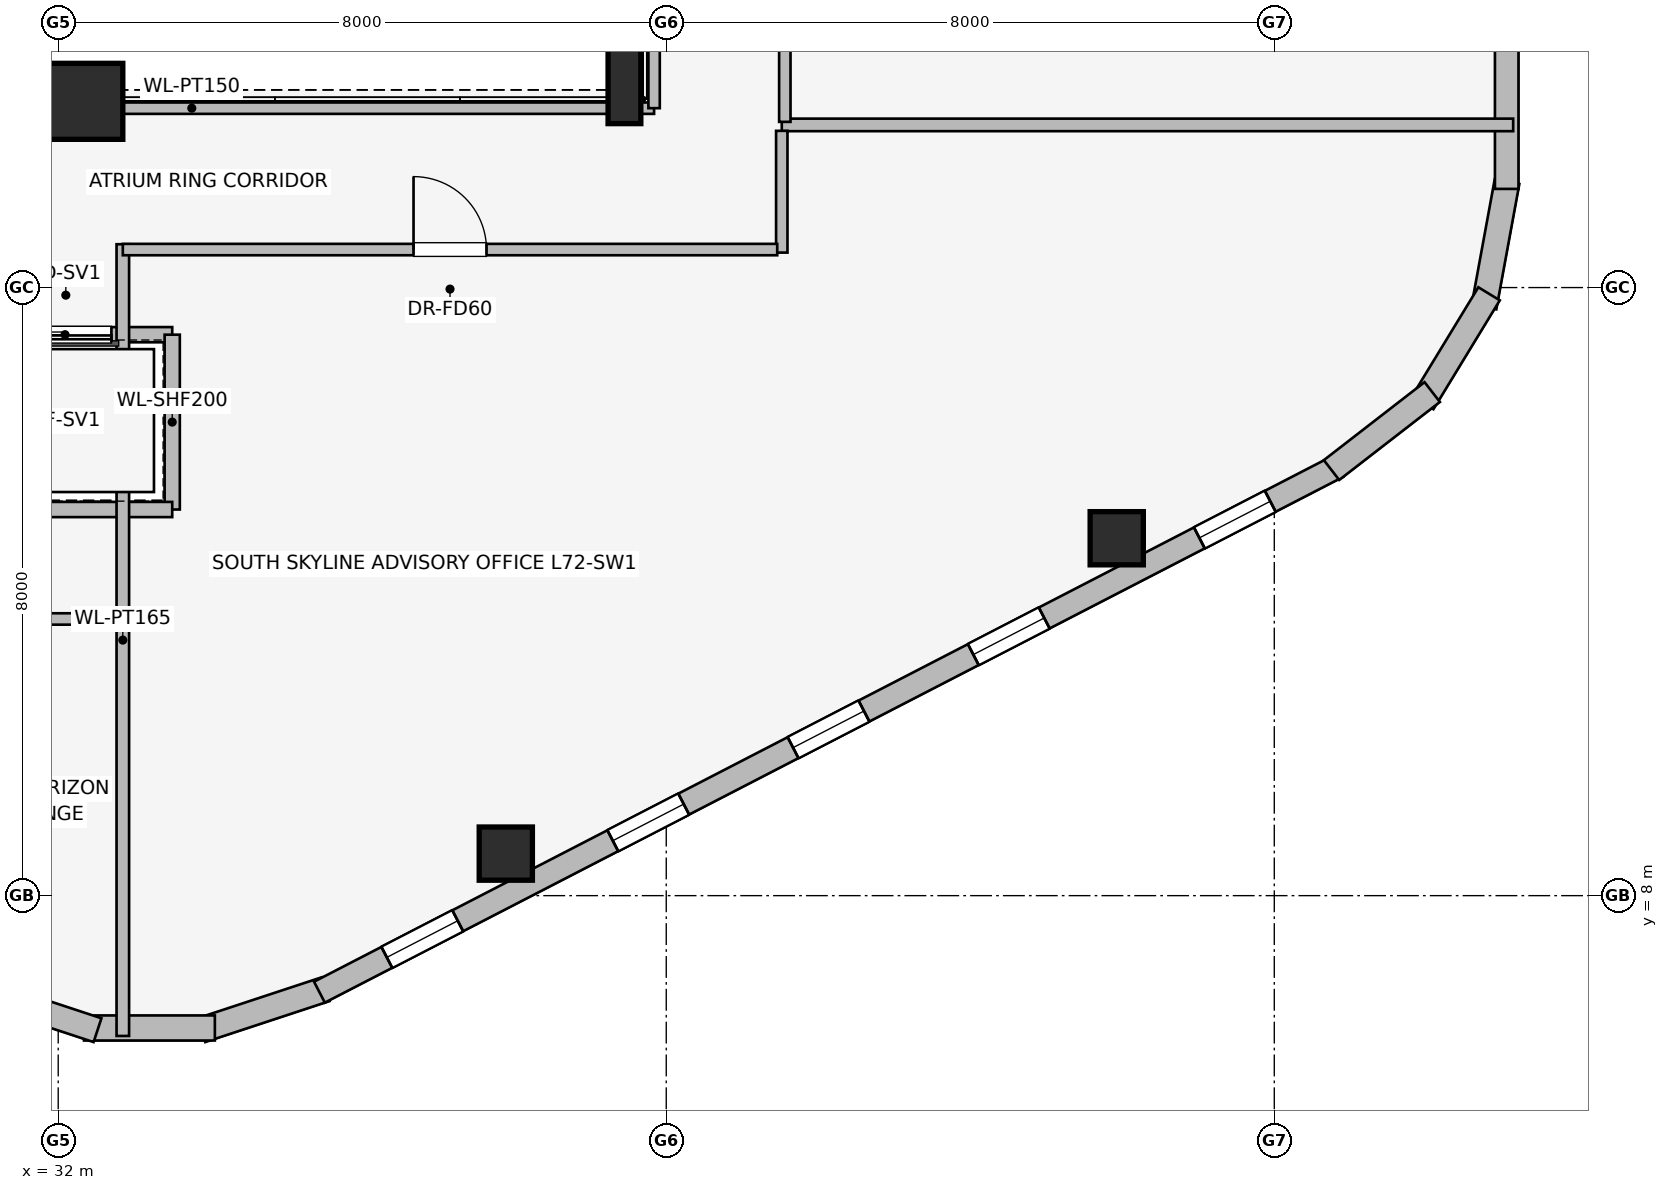
"""IFC4 building model, lengths in metres.
Left out: names, types, materials, properties, quantities, classifications, styles, units other than length and angle.
Written with IfcOpenShell. Run it as: python <this file> out.ifc"""

import sys

from ifc_helpers import new_model, si_unit, direction, frame, frame_2d, origin, origin_2d, place, context, subcontext, project, spatial, rectangle, i_section, extrude, element, fill, save


model = new_model("IFC4")
c1 = context("Model", 3, precision=1e-05, world=origin(), true_north=direction((0.0, 1.0)))
c2 = subcontext(c1, "Body", "Model", "MODEL_VIEW")
j1 = project(units=[si_unit("LENGTHUNIT", "METRE"), si_unit("PLANEANGLEUNIT", "RADIAN")], contexts=[c1])
p1 = place(None, origin())
s1 = spatial("IfcSite", under=j1, at=p1, CompositionType="ELEMENT")
p2 = place(p1, origin())
s2 = spatial("IfcBuilding", under=s1, at=p2, CompositionType="ELEMENT")
p3 = place(p2, frame((0.0, 0.0, 263.2)))
s3 = spatial("IfcBuildingStorey", under=s2, at=p3, CompositionType="ELEMENT", Elevation=263.2)
p4 = place(p3, frame((32.35, 18.45, 0.0), z_axis=(0.0, 0.0, 1.0), x_axis=(1.0, 0.0, 0.0)))
e1 = element("IfcColumn", 1, at=p4, inside=s3, PredefinedType="COLUMN", context=c2, shape_type="SweptSolid", body=[
    extrude(rectangle(XDim=1.0, YDim=1.0, at=origin_2d()), origin(), (0.0, 0.0, 1.0), 3.55),
])
for number, where, z_axis, x_axis in (
    (2, (37.889, 8.553, 0.0), (0.0, 0.0, 1.0), (1.0, 0.0, 0.0)),
    (3, (45.927, 12.702, 0.0), (0.0, 0.0, 1.0), (1.0, 0.0, 0.0)),
):
    element("IfcColumn", number, at=place(p3, frame(where, z_axis=z_axis, x_axis=x_axis)), inside=s3, PredefinedType="COLUMN", context=c2, shape_type="SweptSolid", body=[
        extrude(rectangle(XDim=0.7, YDim=0.7, at=origin_2d()), origin(), (0.0, 0.0, 1.0), 3.55),
    ])
p5 = place(p3, frame((39.45, 18.65, 0.0), z_axis=(0.0, 0.0, 1.0), x_axis=(1.0, 0.0, 0.0)))
e4 = element("IfcColumn", 4, at=p5, inside=s3, PredefinedType="COLUMN", context=c2, shape_type="SweptSolid", body=[
    extrude(i_section(OverallWidth=0.431, OverallDepth=0.987, WebThickness=0.034, FlangeThickness=0.062, at=origin_2d()), origin(), (0.0, 0.0, 1.0), 3.55),
])
p6 = place(p3, frame((35.518, 6.769, 0.0), z_axis=(0.0, 0.0, 1.0), x_axis=(-0.949713440491, -0.313120393699, 0.0)))
e5 = element("IfcWall", 5, at=p6, inside=s3, PredefinedType="STANDARD", context=c2, shape_type="SweptSolid", body=[
    extrude(rectangle(XDim=1.722, YDim=0.33, at=frame_2d((0.861, 0.0))), origin(), (0.0, 0.0, 1.0), 3.29),
])
p7 = place(p3, frame((34.061, 6.259, 0.0), z_axis=(0.0, 0.0, 1.0), x_axis=(-1.0, 0.0, 0.0)))
e6 = element("IfcWall", 6, at=p7, inside=s3, PredefinedType="STANDARD", context=c2, shape_type="SweptSolid", body=[
    extrude(rectangle(XDim=1.722, YDim=0.33, at=frame_2d((0.861, 0.0))), origin(), (0.0, 0.0, 1.0), 3.29),
])
p8 = place(p3, frame((32.517, 6.23, 0.0), z_axis=(0.0, 0.0, 1.0), x_axis=(-0.949713440491, 0.313120393699, 0.0)))
e7 = element("IfcWall", 7, at=p8, inside=s3, PredefinedType="STANDARD", context=c2, shape_type="SweptSolid", body=[
    extrude(rectangle(XDim=1.722, YDim=0.33, at=frame_2d((0.861, 0.0))), origin(), (0.0, 0.0, 1.0), 3.29),
])
p9 = place(p3, frame((48.834, 13.646, 0.0), z_axis=(0.0, 0.0, 1.0), x_axis=(-0.888581481622, -0.458718814218, 0.0)))
e8 = element("IfcWall", 8, at=p9, inside=s3, PredefinedType="STANDARD", context=c2, shape_type="SweptSolid", body=[
    extrude(rectangle(XDim=15.077, YDim=0.31, at=frame_2d((7.539, 0.0))), origin(), (0.0, 0.0, 1.0), 3.29),
])
p10 = place(p9, frame((0.998, 0.0, 0.75)))
e9 = element("IfcOpeningElement", 9, at=p10, cuts=e8, PredefinedType="OPENING", context=c2, shape_type="SweptSolid", body=[
    extrude(rectangle(XDim=1.05, YDim=1.4, at=frame_2d((0.525, 0.7))), frame((0.0, 0.165, 0.0), z_axis=(0.0, -1.0, 0.0), x_axis=(1.0, 0.0, 0.0)), (0.0, 0.0, 1.0), 0.33),
])
p11 = place(p9, frame((4.345, 0.0, 0.75)))
e10 = element("IfcOpeningElement", 10, at=p11, cuts=e8, PredefinedType="OPENING", context=c2, shape_type="SweptSolid", body=[
    extrude(rectangle(XDim=1.05, YDim=1.4, at=frame_2d((0.525, 0.7))), frame((0.0, 0.165, 0.0), z_axis=(0.0, -1.0, 0.0), x_axis=(1.0, 0.0, 0.0)), (0.0, 0.0, 1.0), 0.33),
])
p12 = place(p9, frame((7.014, 0.0, 0.75)))
e11 = element("IfcOpeningElement", 11, at=p12, cuts=e8, PredefinedType="OPENING", context=c2, shape_type="SweptSolid", body=[
    extrude(rectangle(XDim=1.05, YDim=1.4, at=frame_2d((0.525, 0.7))), frame((0.0, 0.165, 0.0), z_axis=(0.0, -1.0, 0.0), x_axis=(1.0, 0.0, 0.0)), (0.0, 0.0, 1.0), 0.33),
])
p13 = place(p9, frame((9.683, 0.0, 0.75)))
e12 = element("IfcOpeningElement", 12, at=p13, cuts=e8, PredefinedType="OPENING", context=c2, shape_type="SweptSolid", body=[
    extrude(rectangle(XDim=1.05, YDim=1.4, at=frame_2d((0.525, 0.7))), frame((0.0, 0.165, 0.0), z_axis=(0.0, -1.0, 0.0), x_axis=(1.0, 0.0, 0.0)), (0.0, 0.0, 1.0), 0.33),
])
p14 = place(p9, frame((13.029, 0.0, 0.75)))
e13 = element("IfcOpeningElement", 13, at=p14, cuts=e8, PredefinedType="OPENING", context=c2, shape_type="SweptSolid", body=[
    extrude(rectangle(XDim=1.05, YDim=1.4, at=frame_2d((0.525, 0.7))), frame((0.0, 0.165, 0.0), z_axis=(0.0, -1.0, 0.0), x_axis=(1.0, 0.0, 0.0)), (0.0, 0.0, 1.0), 0.33),
])
p15 = place(p3, frame((51.062, 17.392, 0.0), z_axis=(0.0, 0.0, 1.0), x_axis=(-0.180691763044, -0.983539773862, 0.0)))
e14 = element("IfcWall", 14, at=p15, inside=s3, PredefinedType="STANDARD", context=c2, shape_type="SweptSolid", body=[
    extrude(rectangle(XDim=1.677, YDim=0.33, at=frame_2d((0.838, 0.0))), origin(), (0.0, 0.0, 1.0), 3.29),
])
p16 = place(p3, frame((50.826, 15.918, 0.0), z_axis=(0.0, 0.0, 1.0), x_axis=(-0.520325409202, -0.853968072318, 0.0)))
e15 = element("IfcWall", 15, at=p16, inside=s3, PredefinedType="STANDARD", context=c2, shape_type="SweptSolid", body=[
    extrude(rectangle(XDim=1.678, YDim=0.33, at=frame_2d((0.839, 0.0))), origin(), (0.0, 0.0, 1.0), 3.29),
])
p17 = place(p3, frame((50.078, 14.625, 0.0), z_axis=(0.0, 0.0, 1.0), x_axis=(-0.790691856293, -0.61221433207, 0.0)))
e16 = element("IfcWall", 16, at=p17, inside=s3, PredefinedType="STANDARD", context=c2, shape_type="SweptSolid", body=[
    extrude(rectangle(XDim=1.676, YDim=0.33, at=frame_2d((0.838, 0.0))), origin(), (0.0, 0.0, 1.0), 3.29),
])
p18 = place(p3, frame((51.058, 30.702, 0.0), z_axis=(0.0, 0.0, 1.0), x_axis=(0.0, -1.0, 0.0)))
e17 = element("IfcWall", 17, at=p18, inside=s3, PredefinedType="STANDARD", context=c2, shape_type="SweptSolid", body=[
    extrude(rectangle(XDim=13.404, YDim=0.31, at=frame_2d((6.702, 0.0))), origin(), (0.0, 0.0, 1.0), 3.29),
])
p19 = place(p18, frame((5.455, 0.0, 0.75)))
e18 = element("IfcOpeningElement", 18, at=p19, cuts=e17, PredefinedType="OPENING", context=c2, shape_type="SweptSolid", body=[
    extrude(rectangle(XDim=2.4, YDim=1.6, at=frame_2d((1.2, 0.8))), frame((0.0, 0.165, 0.0), z_axis=(0.0, -1.0, 0.0), x_axis=(1.0, 0.0, 0.0)), (0.0, 0.0, 1.0), 0.33),
])
p20 = place(p3, frame((33.5, 15.38, 0.0), z_axis=(0.0, 0.0, 1.0), x_axis=(-1.0, 0.0, 0.0)))
e19 = element("IfcWall", 19, at=p20, inside=s3, PredefinedType="PARTITIONING", context=c2, shape_type="SweptSolid", body=[
    extrude(rectangle(XDim=2.82, YDim=0.2, at=frame_2d((1.41, 0.0))), origin(), (0.0, 0.0, 1.0), 3.29),
])
p21 = place(p20, frame((0.8, 0.0, 0.0)))
e20 = element("IfcOpeningElement", 20, at=p21, cuts=e19, PredefinedType="OPENING", context=c2, shape_type="SweptSolid", body=[
    extrude(rectangle(XDim=1.2, YDim=2.2, at=frame_2d((0.6, 1.1))), frame((0.0, 0.11, 0.0), z_axis=(0.0, -1.0, 0.0), x_axis=(1.0, 0.0, 0.0)), (0.0, 0.0, 1.0), 0.22),
])
p22 = place(p3, frame((33.5, 13.08, 0.0), z_axis=(0.0, 0.0, 1.0), x_axis=(0.0, 1.0, 0.0)))
e21 = element("IfcWall", 21, at=p22, inside=s3, PredefinedType="PARTITIONING", context=c2, shape_type="SweptSolid", body=[
    extrude(rectangle(XDim=2.3, YDim=0.2, at=frame_2d((1.15, 0.0))), origin(), (0.0, 0.0, 1.0), 3.29),
])
p23 = place(p3, frame((30.879, 13.08, 0.0), z_axis=(0.0, 0.0, 1.0), x_axis=(1.0, 0.0, 0.0)))
e22 = element("IfcWall", 22, at=p23, inside=s3, PredefinedType="PARTITIONING", context=c2, shape_type="SweptSolid", body=[
    extrude(rectangle(XDim=2.621, YDim=0.2, at=frame_2d((1.311, 0.0))), origin(), (0.0, 0.0, 1.0), 3.29),
])
p24 = place(p3, frame((27.675, 18.36, 0.0), z_axis=(0.0, 0.0, 1.0), x_axis=(1.0, 0.0, 0.0)))
e23 = element("IfcWall", 23, at=p24, inside=s3, PredefinedType="PARTITIONING", context=c2, shape_type="SweptSolid", body=[
    extrude(rectangle(XDim=12.165, YDim=0.15, at=frame_2d((6.083, 0.0))), origin(), (0.0, 0.0, 1.0), 2.431),
])
p25 = place(p3, frame((39.84, 18.36, 0.0), z_axis=(0.0, 0.0, 1.0), x_axis=(0.0, 1.0, 0.0)))
e24 = element("IfcWall", 24, at=p25, inside=s3, PredefinedType="PARTITIONING", context=c2, shape_type="SweptSolid", body=[
    extrude(rectangle(XDim=11.28, YDim=0.15, at=frame_2d((5.64, 0.0))), origin(), (0.0, 0.0, 1.0), 3.29),
])
p26 = place(p3, frame((32.85, 6.154, 0.0), z_axis=(0.0, 0.0, 1.0), x_axis=(0.0, 1.0, 0.0)))
e25 = element("IfcWall", 25, at=p26, inside=s3, PredefinedType="PARTITIONING", context=c2, shape_type="SweptSolid", body=[
    extrude(rectangle(XDim=10.416, YDim=0.165, at=frame_2d((5.208, 0.0))), origin(), (0.0, 0.0, 1.0), 3.29),
])
p27 = place(p3, frame((21.244, 11.64, 0.0), z_axis=(0.0, 0.0, 1.0), x_axis=(1.0, 0.0, 0.0)))
e26 = element("IfcWall", 26, at=p27, inside=s3, PredefinedType="PARTITIONING", context=c2, shape_type="SweptSolid", body=[
    extrude(rectangle(XDim=11.606, YDim=0.15, at=frame_2d((5.803, 0.0))), origin(), (0.0, 0.0, 1.0), 2.833),
])
p28 = place(p27, frame((4.856, 0.0, 0.0)))
e27 = element("IfcOpeningElement", 27, at=p28, cuts=e26, PredefinedType="OPENING", context=c2, shape_type="SweptSolid", body=[
    extrude(rectangle(XDim=0.9, YDim=2.0, at=frame_2d((0.45, 1.0))), frame((0.0, 0.085, 0.0), z_axis=(0.0, -1.0, 0.0), x_axis=(1.0, 0.0, 0.0)), (0.0, 0.0, 1.0), 0.17),
])
p29 = place(p27, frame((8.306, 0.0, 0.0)))
e28 = element("IfcOpeningElement", 28, at=p29, cuts=e26, PredefinedType="OPENING", context=c2, shape_type="SweptSolid", body=[
    extrude(rectangle(XDim=0.9, YDim=2.0, at=frame_2d((0.45, 1.0))), frame((0.0, 0.085, 0.0), z_axis=(0.0, -1.0, 0.0), x_axis=(1.0, 0.0, 0.0)), (0.0, 0.0, 1.0), 0.17),
])
p30 = place(p3, frame((41.52, 18.14, 0.0), z_axis=(0.0, 0.0, 1.0), x_axis=(1.0, 0.0, 0.0)))
e29 = element("IfcWall", 29, at=p30, inside=s3, PredefinedType="PARTITIONING", context=c2, shape_type="SweptSolid", body=[
    extrude(rectangle(XDim=9.623, YDim=0.165, at=frame_2d((4.812, 0.0))), origin(), (0.0, 0.0, 1.0), 3.29),
])
p31 = place(p3, frame((41.56, 18.18, 0.0), z_axis=(0.0, 0.0, 1.0), x_axis=(0.0, 1.0, 0.0)))
e30 = element("IfcWall", 30, at=p31, inside=s3, PredefinedType="PARTITIONING", context=c2, shape_type="SweptSolid", body=[
    extrude(rectangle(XDim=3.102, YDim=0.15, at=frame_2d((1.551, 0.0))), origin(), (0.0, 0.0, 1.0), 3.29),
])
p32 = place(p31, frame((1.071, 0.0, 0.0)))
e31 = element("IfcOpeningElement", 31, at=p32, cuts=e30, PredefinedType="OPENING", context=c2, shape_type="SweptSolid", body=[
    extrude(rectangle(XDim=0.96, YDim=2.0, at=frame_2d((0.48, 1.0))), frame((0.0, 0.085, 0.0), z_axis=(0.0, -1.0, 0.0), x_axis=(1.0, 0.0, 0.0)), (0.0, 0.0, 1.0), 0.17),
])
p33 = place(p3, frame((41.52, 16.46, 0.0), z_axis=(0.0, 0.0, 1.0), x_axis=(0.0, 1.0, 0.0)))
e32 = element("IfcWall", 32, at=p33, inside=s3, PredefinedType="PARTITIONING", context=c2, shape_type="SweptSolid", body=[
    extrude(rectangle(XDim=1.602, YDim=0.15, at=frame_2d((0.801, 0.0))), origin(), (0.0, 0.0, 1.0), 3.29),
])
p34 = place(p3, frame((32.85, 16.5, 0.0), z_axis=(0.0, 0.0, 1.0), x_axis=(1.0, 0.0, 0.0)))
e33 = element("IfcWall", 33, at=p34, inside=s3, PredefinedType="PARTITIONING", context=c2, shape_type="SweptSolid", body=[
    extrude(rectangle(XDim=8.61, YDim=0.15, at=frame_2d((4.305, 0.0))), origin(), (0.0, 0.0, 1.0), 3.29),
])
p35 = place(p34, frame((3.825, 0.0, 0.0)))
e34 = element("IfcOpeningElement", 34, at=p35, cuts=e33, PredefinedType="OPENING", context=c2, shape_type="SweptSolid", body=[
    extrude(rectangle(XDim=0.96, YDim=2.0, at=frame_2d((0.48, 1.0))), frame((0.0, 0.085, 0.0), z_axis=(0.0, -1.0, 0.0), x_axis=(1.0, 0.0, 0.0)), (0.0, 0.0, 1.0), 0.17),
])
p36 = place(p10, origin())
e35 = element("IfcWindow", 35, at=p36, inside=s3, PartitioningType="SINGLE_PANEL", PredefinedType="WINDOW", context=c2, shape_type="SweptSolid", body=[
    extrude(rectangle(XDim=1.05, YDim=1.4, at=frame_2d((0.525, 0.7))), frame((0.0, 0.03, 0.0), z_axis=(0.0, -1.0, 0.0), x_axis=(1.0, 0.0, 0.0)), (0.0, 0.0, 1.0), 0.06),
])
fill(e9, e35)
p37 = place(p11, origin())
e36 = element("IfcWindow", 36, at=p37, inside=s3, PartitioningType="SINGLE_PANEL", PredefinedType="WINDOW", context=c2, shape_type="SweptSolid", body=[
    extrude(rectangle(XDim=1.05, YDim=1.4, at=frame_2d((0.525, 0.7))), frame((0.0, 0.03, 0.0), z_axis=(0.0, -1.0, 0.0), x_axis=(1.0, 0.0, 0.0)), (0.0, 0.0, 1.0), 0.06),
])
fill(e10, e36)
p38 = place(p12, origin())
e37 = element("IfcWindow", 37, at=p38, inside=s3, PartitioningType="SINGLE_PANEL", PredefinedType="WINDOW", context=c2, shape_type="SweptSolid", body=[
    extrude(rectangle(XDim=1.05, YDim=1.4, at=frame_2d((0.525, 0.7))), frame((0.0, 0.03, 0.0), z_axis=(0.0, -1.0, 0.0), x_axis=(1.0, 0.0, 0.0)), (0.0, 0.0, 1.0), 0.06),
])
fill(e11, e37)
p39 = place(p13, origin())
e38 = element("IfcWindow", 38, at=p39, inside=s3, PartitioningType="SINGLE_PANEL", PredefinedType="WINDOW", context=c2, shape_type="SweptSolid", body=[
    extrude(rectangle(XDim=1.05, YDim=1.4, at=frame_2d((0.525, 0.7))), frame((0.0, 0.03, 0.0), z_axis=(0.0, -1.0, 0.0), x_axis=(1.0, 0.0, 0.0)), (0.0, 0.0, 1.0), 0.06),
])
fill(e12, e38)
p40 = place(p14, origin())
e39 = element("IfcWindow", 39, at=p40, inside=s3, PartitioningType="SINGLE_PANEL", PredefinedType="WINDOW", context=c2, shape_type="SweptSolid", body=[
    extrude(rectangle(XDim=1.05, YDim=1.4, at=frame_2d((0.525, 0.7))), frame((0.0, 0.03, 0.0), z_axis=(0.0, -1.0, 0.0), x_axis=(1.0, 0.0, 0.0)), (0.0, 0.0, 1.0), 0.06),
])
fill(e13, e39)
p41 = place(p21, origin())
e40 = element("IfcDoor", 40, at=p41, inside=s3, OperationType="SLIDING_TO_RIGHT", PredefinedType="DOOR", context=c2, shape_type="SweptSolid", body=[
    extrude(rectangle(XDim=1.2, YDim=2.2, at=frame_2d((0.6, 1.1))), frame((0.0, 0.025, 0.0), z_axis=(0.0, -1.0, 0.0), x_axis=(1.0, 0.0, 0.0)), (0.0, 0.0, 1.0), 0.05),
])
fill(e20, e40)
p42 = place(p35, origin())
e41 = element("IfcDoor", 41, at=p42, inside=s3, OperationType="SINGLE_SWING_LEFT", PredefinedType="DOOR", context=c2, shape_type="SweptSolid", body=[
    extrude(rectangle(XDim=0.96, YDim=2.0, at=frame_2d((0.48, 1.0))), frame((0.0, 0.025, 0.0), z_axis=(0.0, -1.0, 0.0), x_axis=(1.0, 0.0, 0.0)), (0.0, 0.0, 1.0), 0.05),
])
fill(e34, e41)
save(model, sys.argv[1])
